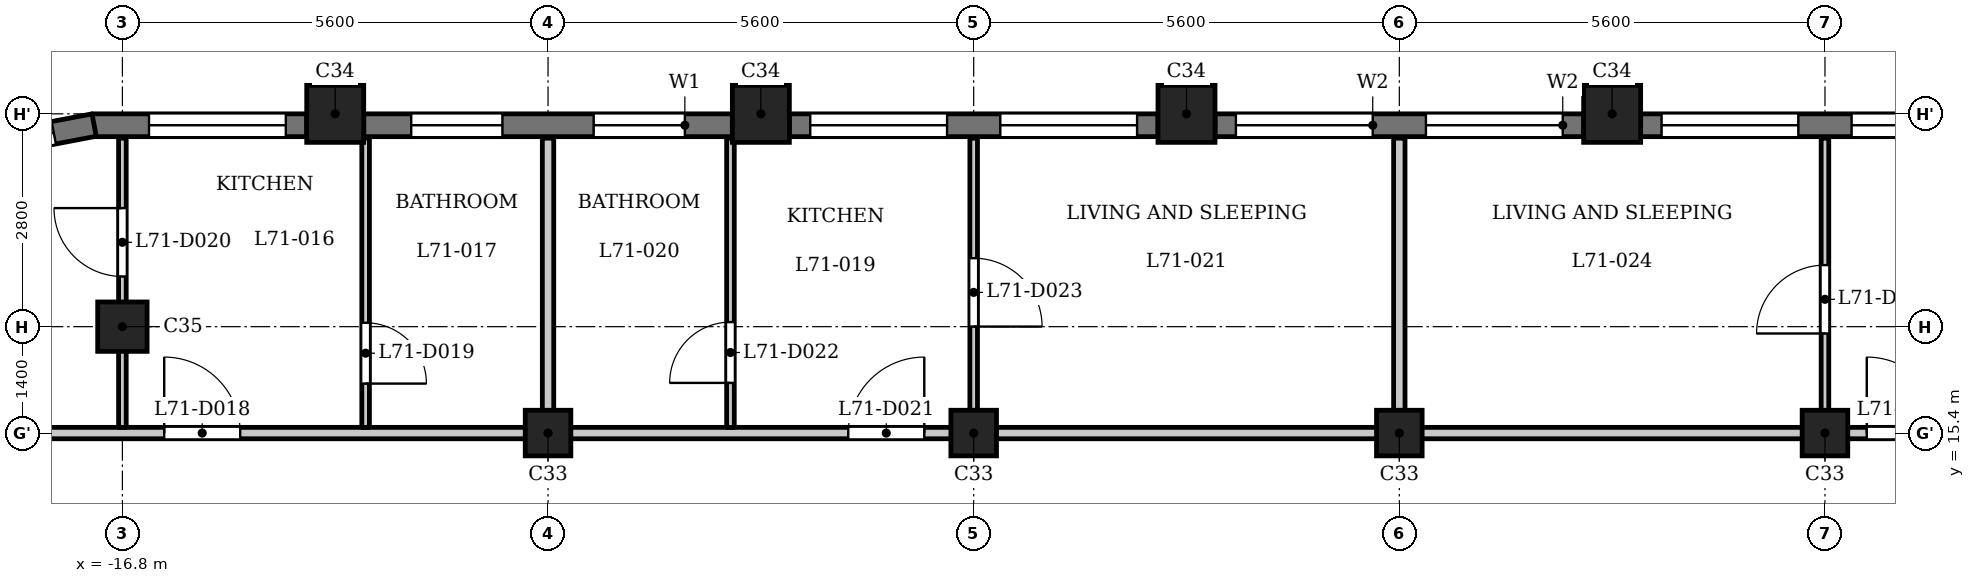
"""IFC4 building model, lengths in metres.
Left out: names, types, materials, properties, quantities, classifications, styles, units other than length and angle.
Written with IfcOpenShell. Run it as: python <this file> out.ifc"""

import sys

from ifc_helpers import new_model, si_unit, direction, frame, frame_2d, origin, origin_2d, place, context, subcontext, project, spatial, rectangle, extrude, element, fill, save


model = new_model("IFC4")
c1 = context("Model", 3, precision=1e-05, world=origin(), true_north=direction((0.0, 1.0)))
c2 = subcontext(c1, "Body", "Model", "MODEL_VIEW")
j1 = project(units=[si_unit("LENGTHUNIT", "METRE"), si_unit("PLANEANGLEUNIT", "RADIAN")], contexts=[c1])
p1 = place(None, origin())
s1 = spatial("IfcSite", under=j1, at=p1, CompositionType="ELEMENT")
p2 = place(p1, origin())
s2 = spatial("IfcBuilding", under=s1, at=p2, CompositionType="ELEMENT")
p3 = place(p2, frame((0.0, 0.0, 273.2)))
s3 = spatial("IfcBuildingStorey", under=s2, at=p3, CompositionType="ELEMENT", Elevation=273.2)
for number, where, z_axis, x_axis in (
    (1, (2.8, 19.6, 0.0), (0.0, 0.0, 1.0), (1.0, 0.0, 0.0)),
    (2, (-2.8, 19.6, 0.0), (0.0, 0.0, 1.0), (1.0, 0.0, 0.0)),
    (3, (-8.4, 19.6, 0.0), (0.0, 0.0, 1.0), (1.0, 0.0, 0.0)),
    (4, (-14.0, 19.6, 0.0), (0.0, 0.0, 1.0), (1.0, 0.0, 0.0)),
):
    element("IfcColumn", number, at=place(p3, frame(where, z_axis=z_axis, x_axis=x_axis)), inside=s3, PredefinedType="COLUMN", context=c2, shape_type="SweptSolid", body=[
        extrude(rectangle(XDim=0.75, YDim=0.75, at=origin_2d()), origin(), (0.0, 0.0, 1.0), 3.5),
    ])
p4 = place(p3, frame((-16.8, 16.8, 0.0), z_axis=(0.0, 0.0, 1.0), x_axis=(1.0, 0.0, 0.0)))
e5 = element("IfcColumn", 5, at=p4, inside=s3, PredefinedType="COLUMN", context=c2, shape_type="SweptSolid", body=[
    extrude(rectangle(XDim=0.65, YDim=0.65, at=origin_2d()), origin(), (0.0, 0.0, 1.0), 3.5),
])
for number, where, z_axis, x_axis in (
    (6, (-11.2, 15.4, 0.0), (0.0, 0.0, 1.0), (1.0, 0.0, 0.0)),
    (7, (-5.6, 15.4, 0.0), (0.0, 0.0, 1.0), (1.0, 0.0, 0.0)),
    (8, (0.0, 15.4, 0.0), (0.0, 0.0, 1.0), (1.0, 0.0, 0.0)),
    (9, (5.6, 15.4, 0.0), (0.0, 0.0, 1.0), (1.0, 0.0, 0.0)),
):
    element("IfcColumn", number, at=place(p3, frame(where, z_axis=z_axis, x_axis=x_axis)), inside=s3, PredefinedType="COLUMN", context=c2, shape_type="SweptSolid", body=[
        extrude(rectangle(XDim=0.6, YDim=0.6, at=origin_2d()), origin(), (0.0, 0.0, 1.0), 3.5),
    ])
p5 = place(p3, frame((8.025, 19.45, 0.0), z_axis=(0.0, 0.0, 1.0), x_axis=(-1.0, 0.0, 0.0)))
e10 = element("IfcWall", 10, at=p5, inside=s3, PredefinedType="SOLIDWALL", context=c2, shape_type="SweptSolid", body=[
    extrude(rectangle(XDim=4.85, YDim=0.3, at=frame_2d((2.425, 0.0))), origin(), (0.0, 0.0, 1.0), 2.55),
])
p6 = place(p5, frame((0.275, 0.0, 0.9)))
e11 = element("IfcOpeningElement", 11, at=p6, cuts=e10, PredefinedType="OPENING", context=c2, shape_type="SweptSolid", body=[
    extrude(rectangle(XDim=1.8, YDim=1.25, at=frame_2d((0.9, 0.625))), frame((0.0, 0.16, 0.0), z_axis=(0.0, -1.0, 0.0), x_axis=(1.0, 0.0, 0.0)), (0.0, 0.0, 1.0), 0.32),
])
p7 = place(p5, frame((2.775, 0.0, 0.9)))
e12 = element("IfcOpeningElement", 12, at=p7, cuts=e10, PredefinedType="OPENING", context=c2, shape_type="SweptSolid", body=[
    extrude(rectangle(XDim=1.8, YDim=1.25, at=frame_2d((0.9, 0.625))), frame((0.0, 0.16, 0.0), z_axis=(0.0, -1.0, 0.0), x_axis=(1.0, 0.0, 0.0)), (0.0, 0.0, 1.0), 0.32),
])
p8 = place(p3, frame((2.425, 19.45, 0.0), z_axis=(0.0, 0.0, 1.0), x_axis=(-1.0, 0.0, 0.0)))
e13 = element("IfcWall", 13, at=p8, inside=s3, PredefinedType="SOLIDWALL", context=c2, shape_type="SweptSolid", body=[
    extrude(rectangle(XDim=4.85, YDim=0.3, at=frame_2d((2.425, 0.0))), origin(), (0.0, 0.0, 1.0), 2.55),
])
p9 = place(p8, frame((0.275, 0.0, 0.9)))
e14 = element("IfcOpeningElement", 14, at=p9, cuts=e13, PredefinedType="OPENING", context=c2, shape_type="SweptSolid", body=[
    extrude(rectangle(XDim=1.8, YDim=1.25, at=frame_2d((0.9, 0.625))), frame((0.0, 0.16, 0.0), z_axis=(0.0, -1.0, 0.0), x_axis=(1.0, 0.0, 0.0)), (0.0, 0.0, 1.0), 0.32),
])
p10 = place(p8, frame((2.775, 0.0, 0.9)))
e15 = element("IfcOpeningElement", 15, at=p10, cuts=e13, PredefinedType="OPENING", context=c2, shape_type="SweptSolid", body=[
    extrude(rectangle(XDim=1.8, YDim=1.25, at=frame_2d((0.9, 0.625))), frame((0.0, 0.16, 0.0), z_axis=(0.0, -1.0, 0.0), x_axis=(1.0, 0.0, 0.0)), (0.0, 0.0, 1.0), 0.32),
])
p11 = place(p3, frame((-3.175, 19.45, 0.0), z_axis=(0.0, 0.0, 1.0), x_axis=(-1.0, 0.0, 0.0)))
e16 = element("IfcWall", 16, at=p11, inside=s3, PredefinedType="SOLIDWALL", context=c2, shape_type="SweptSolid", body=[
    extrude(rectangle(XDim=4.85, YDim=0.3, at=frame_2d((2.425, 0.0))), origin(), (0.0, 0.0, 1.0), 2.55),
])
p12 = place(p11, frame((0.275, 0.0, 0.9)))
e17 = element("IfcOpeningElement", 17, at=p12, cuts=e16, PredefinedType="OPENING", context=c2, shape_type="SweptSolid", body=[
    extrude(rectangle(XDim=1.8, YDim=1.25, at=frame_2d((0.9, 0.625))), frame((0.0, 0.16, 0.0), z_axis=(0.0, -1.0, 0.0), x_axis=(1.0, 0.0, 0.0)), (0.0, 0.0, 1.0), 0.32),
])
p13 = place(p11, frame((2.775, 0.0, 0.9)))
e18 = element("IfcOpeningElement", 18, at=p13, cuts=e16, PredefinedType="OPENING", context=c2, shape_type="SweptSolid", body=[
    extrude(rectangle(XDim=1.8, YDim=1.25, at=frame_2d((0.9, 0.625))), frame((0.0, 0.16, 0.0), z_axis=(0.0, -1.0, 0.0), x_axis=(1.0, 0.0, 0.0)), (0.0, 0.0, 1.0), 0.32),
])
p14 = place(p3, frame((-8.775, 19.45, 0.0), z_axis=(0.0, 0.0, 1.0), x_axis=(-1.0, 0.0, 0.0)))
e19 = element("IfcWall", 19, at=p14, inside=s3, PredefinedType="SOLIDWALL", context=c2, shape_type="SweptSolid", body=[
    extrude(rectangle(XDim=4.85, YDim=0.3, at=frame_2d((2.425, 0.0))), origin(), (0.0, 0.0, 1.0), 2.55),
])
p15 = place(p14, frame((0.625, 0.0, 0.6)))
e20 = element("IfcOpeningElement", 20, at=p15, cuts=e19, PredefinedType="OPENING", context=c2, shape_type="SweptSolid", body=[
    extrude(rectangle(XDim=1.2, YDim=1.55, at=frame_2d((0.6, 0.775))), frame((0.0, 0.16, 0.0), z_axis=(0.0, -1.0, 0.0), x_axis=(1.0, 0.0, 0.0)), (0.0, 0.0, 1.0), 0.32),
])
p16 = place(p14, frame((3.025, 0.0, 0.6)))
e21 = element("IfcOpeningElement", 21, at=p16, cuts=e19, PredefinedType="OPENING", context=c2, shape_type="SweptSolid", body=[
    extrude(rectangle(XDim=1.2, YDim=1.55, at=frame_2d((0.6, 0.775))), frame((0.0, 0.16, 0.0), z_axis=(0.0, -1.0, 0.0), x_axis=(1.0, 0.0, 0.0)), (0.0, 0.0, 1.0), 0.32),
])
p17 = place(p3, frame((-14.375, 19.45, 0.0), z_axis=(0.0, 0.0, 1.0), x_axis=(-1.0, 0.0, 0.0)))
e22 = element("IfcWall", 22, at=p17, inside=s3, PredefinedType="SOLIDWALL", context=c2, shape_type="SweptSolid", body=[
    extrude(rectangle(XDim=2.825, YDim=0.3, at=frame_2d((1.413, 0.0))), origin(), (0.0, 0.0, 1.0), 2.55),
])
p18 = place(p17, frame((0.275, 0.0, 0.9)))
e23 = element("IfcOpeningElement", 23, at=p18, cuts=e22, PredefinedType="OPENING", context=c2, shape_type="SweptSolid", body=[
    extrude(rectangle(XDim=1.8, YDim=1.25, at=frame_2d((0.9, 0.625))), frame((0.0, 0.16, 0.0), z_axis=(0.0, -1.0, 0.0), x_axis=(1.0, 0.0, 0.0)), (0.0, 0.0, 1.0), 0.32),
])
p19 = place(p3, frame((-17.172, 19.453, 0.0), z_axis=(0.0, 0.0, 1.0), x_axis=(-0.982284001233, -0.187398348234, 0.0)))
e24 = element("IfcWall", 24, at=p19, inside=s3, PredefinedType="SOLIDWALL", context=c2, shape_type="SweptSolid", body=[
    extrude(rectangle(XDim=1.881, YDim=0.3, at=frame_2d((0.941, 0.0))), origin(), (0.0, 0.0, 1.0), 2.55),
])
p20 = place(p19, frame((0.541, 0.0, 0.6)))
e25 = element("IfcOpeningElement", 25, at=p20, cuts=e24, PredefinedType="OPENING", context=c2, shape_type="SweptSolid", body=[
    extrude(rectangle(XDim=0.8, YDim=1.55, at=frame_2d((0.4, 0.775))), frame((0.0, 0.16, 0.0), z_axis=(0.0, -1.0, 0.0), x_axis=(1.0, 0.0, 0.0)), (0.0, 0.0, 1.0), 0.32),
])
p21 = place(p3, frame((-23.55, 15.4, 0.0), z_axis=(0.0, 0.0, 1.0), x_axis=(1.0, 0.0, 0.0)))
e26 = element("IfcWall", 26, at=p21, inside=s3, PredefinedType="PARTITIONING", context=c2, shape_type="SweptSolid", body=[
    extrude(rectangle(XDim=46.872, YDim=0.15, at=frame_2d((23.436, 0.0))), origin(), (0.0, 0.0, 1.0), 3.2),
])
p22 = place(p21, frame((7.3, 0.0, 0.0)))
e27 = element("IfcOpeningElement", 27, at=p22, cuts=e26, PredefinedType="OPENING", context=c2, shape_type="SweptSolid", body=[
    extrude(rectangle(XDim=1.0, YDim=2.1, at=frame_2d((0.5, 1.05))), frame((0.0, 0.085, 0.0), z_axis=(0.0, -1.0, 0.0), x_axis=(1.0, 0.0, 0.0)), (0.0, 0.0, 1.0), 0.17),
])
p23 = place(p21, frame((16.3, 0.0, 0.0)))
e28 = element("IfcOpeningElement", 28, at=p23, cuts=e26, PredefinedType="OPENING", context=c2, shape_type="SweptSolid", body=[
    extrude(rectangle(XDim=1.0, YDim=2.1, at=frame_2d((0.5, 1.05))), frame((0.0, 0.085, 0.0), z_axis=(0.0, -1.0, 0.0), x_axis=(1.0, 0.0, 0.0)), (0.0, 0.0, 1.0), 0.17),
])
p24 = place(p21, frame((29.7, 0.0, 0.0)))
e29 = element("IfcOpeningElement", 29, at=p24, cuts=e26, PredefinedType="OPENING", context=c2, shape_type="SweptSolid", body=[
    extrude(rectangle(XDim=1.0, YDim=2.1, at=frame_2d((0.5, 1.05))), frame((0.0, 0.085, 0.0), z_axis=(0.0, -1.0, 0.0), x_axis=(1.0, 0.0, 0.0)), (0.0, 0.0, 1.0), 0.17),
])
p25 = place(p21, frame((38.7, 0.0, 0.0)))
e30 = element("IfcOpeningElement", 30, at=p25, cuts=e26, PredefinedType="OPENING", context=c2, shape_type="SweptSolid", body=[
    extrude(rectangle(XDim=1.0, YDim=2.1, at=frame_2d((0.5, 1.05))), frame((0.0, 0.085, 0.0), z_axis=(0.0, -1.0, 0.0), x_axis=(1.0, 0.0, 0.0)), (0.0, 0.0, 1.0), 0.17),
])
p26 = place(p3, frame((-16.8, 15.475, 0.0), z_axis=(0.0, 0.0, 1.0), x_axis=(0.0, 1.0, 0.0)))
e31 = element("IfcWall", 31, at=p26, inside=s3, PredefinedType="PARTITIONING", context=c2, shape_type="SweptSolid", body=[
    extrude(rectangle(XDim=3.805, YDim=0.1, at=frame_2d((1.902, 0.0))), origin(), (0.0, 0.0, 1.0), 3.2),
])
p27 = place(p26, frame((1.985, 0.0, 0.0)))
e32 = element("IfcOpeningElement", 32, at=p27, cuts=e31, PredefinedType="OPENING", context=c2, shape_type="SweptSolid", body=[
    extrude(rectangle(XDim=0.9, YDim=2.1, at=frame_2d((0.45, 1.05))), frame((0.0, 0.06, 0.0), z_axis=(0.0, -1.0, 0.0), x_axis=(1.0, 0.0, 0.0)), (0.0, 0.0, 1.0), 0.12),
])
p28 = place(p3, frame((-13.6, 15.475, 0.0), z_axis=(0.0, 0.0, 1.0), x_axis=(0.0, 1.0, 0.0)))
e33 = element("IfcWall", 33, at=p28, inside=s3, PredefinedType="PARTITIONING", context=c2, shape_type="SweptSolid", body=[
    extrude(rectangle(XDim=3.805, YDim=0.1, at=frame_2d((1.902, 0.0))), origin(), (0.0, 0.0, 1.0), 3.2),
])
p29 = place(p28, frame((0.576, 0.0, 0.0)))
e34 = element("IfcOpeningElement", 34, at=p29, cuts=e33, PredefinedType="OPENING", context=c2, shape_type="SweptSolid", body=[
    extrude(rectangle(XDim=0.8, YDim=2.1, at=frame_2d((0.4, 1.05))), frame((0.0, 0.06, 0.0), z_axis=(0.0, -1.0, 0.0), x_axis=(1.0, 0.0, 0.0)), (0.0, 0.0, 1.0), 0.12),
])
p30 = place(p3, frame((-11.2, 15.475, 0.0), z_axis=(0.0, 0.0, 1.0), x_axis=(0.0, 1.0, 0.0)))
e35 = element("IfcWall", 35, at=p30, inside=s3, PredefinedType="PARTITIONING", context=c2, shape_type="SweptSolid", body=[
    extrude(rectangle(XDim=3.805, YDim=0.15, at=frame_2d((1.902, 0.0))), origin(), (0.0, 0.0, 1.0), 3.2),
])
p31 = place(p3, frame((-8.8, 15.475, 0.0), z_axis=(0.0, 0.0, 1.0), x_axis=(0.0, 1.0, 0.0)))
e36 = element("IfcWall", 36, at=p31, inside=s3, PredefinedType="PARTITIONING", context=c2, shape_type="SweptSolid", body=[
    extrude(rectangle(XDim=3.805, YDim=0.1, at=frame_2d((1.902, 0.0))), origin(), (0.0, 0.0, 1.0), 3.2),
])
p32 = place(p31, frame((0.585, 0.0, 0.0)))
e37 = element("IfcOpeningElement", 37, at=p32, cuts=e36, PredefinedType="OPENING", context=c2, shape_type="SweptSolid", body=[
    extrude(rectangle(XDim=0.8, YDim=2.1, at=frame_2d((0.4, 1.05))), frame((0.0, 0.06, 0.0), z_axis=(0.0, -1.0, 0.0), x_axis=(1.0, 0.0, 0.0)), (0.0, 0.0, 1.0), 0.12),
])
p33 = place(p3, frame((-5.6, 15.475, 0.0), z_axis=(0.0, 0.0, 1.0), x_axis=(0.0, 1.0, 0.0)))
e38 = element("IfcWall", 38, at=p33, inside=s3, PredefinedType="PARTITIONING", context=c2, shape_type="SweptSolid", body=[
    extrude(rectangle(XDim=3.805, YDim=0.1, at=frame_2d((1.902, 0.0))), origin(), (0.0, 0.0, 1.0), 3.2),
])
p34 = place(p33, frame((1.326, 0.0, 0.0)))
e39 = element("IfcOpeningElement", 39, at=p34, cuts=e38, PredefinedType="OPENING", context=c2, shape_type="SweptSolid", body=[
    extrude(rectangle(XDim=0.9, YDim=2.1, at=frame_2d((0.45, 1.05))), frame((0.0, 0.06, 0.0), z_axis=(0.0, -1.0, 0.0), x_axis=(1.0, 0.0, 0.0)), (0.0, 0.0, 1.0), 0.12),
])
p35 = place(p3, frame((0.0, 15.475, 0.0), z_axis=(0.0, 0.0, 1.0), x_axis=(0.0, 1.0, 0.0)))
e40 = element("IfcWall", 40, at=p35, inside=s3, PredefinedType="PARTITIONING", context=c2, shape_type="SweptSolid", body=[
    extrude(rectangle(XDim=3.805, YDim=0.15, at=frame_2d((1.902, 0.0))), origin(), (0.0, 0.0, 1.0), 3.2),
])
p36 = place(p3, frame((5.6, 15.475, 0.0), z_axis=(0.0, 0.0, 1.0), x_axis=(0.0, 1.0, 0.0)))
e41 = element("IfcWall", 41, at=p36, inside=s3, PredefinedType="PARTITIONING", context=c2, shape_type="SweptSolid", body=[
    extrude(rectangle(XDim=3.805, YDim=0.1, at=frame_2d((1.902, 0.0))), origin(), (0.0, 0.0, 1.0), 3.2),
])
p37 = place(p36, frame((1.235, 0.0, 0.0)))
e42 = element("IfcOpeningElement", 42, at=p37, cuts=e41, PredefinedType="OPENING", context=c2, shape_type="SweptSolid", body=[
    extrude(rectangle(XDim=0.9, YDim=2.1, at=frame_2d((0.45, 1.05))), frame((0.0, 0.06, 0.0), z_axis=(0.0, -1.0, 0.0), x_axis=(1.0, 0.0, 0.0)), (0.0, 0.0, 1.0), 0.12),
])
p38 = place(p22, origin())
e43 = element("IfcDoor", 43, at=p38, inside=s3, OperationType="SINGLE_SWING_RIGHT", PredefinedType="DOOR", context=c2, shape_type="SweptSolid", body=[
    extrude(rectangle(XDim=1.0, YDim=2.1, at=frame_2d((0.5, 1.05))), frame((0.0, 0.025, 0.0), z_axis=(0.0, -1.0, 0.0), x_axis=(1.0, 0.0, 0.0)), (0.0, 0.0, 1.0), 0.05),
])
fill(e27, e43)
p39 = place(p29, origin())
e44 = element("IfcDoor", 44, at=p39, inside=s3, OperationType="SINGLE_SWING_LEFT", PredefinedType="DOOR", context=c2, shape_type="SweptSolid", body=[
    extrude(rectangle(XDim=0.8, YDim=2.1, at=frame_2d((0.4, 1.05))), frame((0.0, 0.025, 0.0), z_axis=(0.0, -1.0, 0.0), x_axis=(1.0, 0.0, 0.0)), (0.0, 0.0, 1.0), 0.05),
])
fill(e34, e44)
p40 = place(p27, origin())
e45 = element("IfcDoor", 45, at=p40, inside=s3, OperationType="SINGLE_SWING_LEFT", PredefinedType="DOOR", context=c2, shape_type="SweptSolid", body=[
    extrude(rectangle(XDim=0.9, YDim=2.1, at=frame_2d((0.45, 1.05))), frame((0.0, 0.025, 0.0), z_axis=(0.0, -1.0, 0.0), x_axis=(1.0, 0.0, 0.0)), (0.0, 0.0, 1.0), 0.05),
])
fill(e32, e45)
p41 = place(p23, origin())
e46 = element("IfcDoor", 46, at=p41, inside=s3, OperationType="SINGLE_SWING_LEFT", PredefinedType="DOOR", context=c2, shape_type="SweptSolid", body=[
    extrude(rectangle(XDim=1.0, YDim=2.1, at=frame_2d((0.5, 1.05))), frame((0.0, 0.025, 0.0), z_axis=(0.0, -1.0, 0.0), x_axis=(1.0, 0.0, 0.0)), (0.0, 0.0, 1.0), 0.05),
])
fill(e28, e46)
p42 = place(p32, origin())
e47 = element("IfcDoor", 47, at=p42, inside=s3, OperationType="SINGLE_SWING_RIGHT", PredefinedType="DOOR", context=c2, shape_type="SweptSolid", body=[
    extrude(rectangle(XDim=0.8, YDim=2.1, at=frame_2d((0.4, 1.05))), frame((0.0, 0.025, 0.0), z_axis=(0.0, -1.0, 0.0), x_axis=(1.0, 0.0, 0.0)), (0.0, 0.0, 1.0), 0.05),
])
fill(e37, e47)
p43 = place(p34, origin())
e48 = element("IfcDoor", 48, at=p43, inside=s3, OperationType="SINGLE_SWING_LEFT", PredefinedType="DOOR", context=c2, shape_type="SweptSolid", body=[
    extrude(rectangle(XDim=0.9, YDim=2.1, at=frame_2d((0.45, 1.05))), frame((0.0, 0.025, 0.0), z_axis=(0.0, -1.0, 0.0), x_axis=(1.0, 0.0, 0.0)), (0.0, 0.0, 1.0), 0.05),
])
fill(e39, e48)
p44 = place(p24, origin())
e49 = element("IfcDoor", 49, at=p44, inside=s3, OperationType="SINGLE_SWING_RIGHT", PredefinedType="DOOR", context=c2, shape_type="SweptSolid", body=[
    extrude(rectangle(XDim=1.0, YDim=2.1, at=frame_2d((0.5, 1.05))), frame((0.0, 0.025, 0.0), z_axis=(0.0, -1.0, 0.0), x_axis=(1.0, 0.0, 0.0)), (0.0, 0.0, 1.0), 0.05),
])
fill(e29, e49)
p45 = place(p37, origin())
e50 = element("IfcDoor", 50, at=p45, inside=s3, OperationType="SINGLE_SWING_RIGHT", PredefinedType="DOOR", context=c2, shape_type="SweptSolid", body=[
    extrude(rectangle(XDim=0.9, YDim=2.1, at=frame_2d((0.45, 1.05))), frame((0.0, 0.025, 0.0), z_axis=(0.0, -1.0, 0.0), x_axis=(1.0, 0.0, 0.0)), (0.0, 0.0, 1.0), 0.05),
])
fill(e42, e50)
p46 = place(p6, origin())
e51 = element("IfcWindow", 51, at=p46, inside=s3, PartitioningType="SINGLE_PANEL", PredefinedType="WINDOW", context=c2, shape_type="SweptSolid", body=[
    extrude(rectangle(XDim=1.8, YDim=1.25, at=frame_2d((0.9, 0.625))), frame((0.0, 0.03, 0.0), z_axis=(0.0, -1.0, 0.0), x_axis=(1.0, 0.0, 0.0)), (0.0, 0.0, 1.0), 0.06),
])
fill(e11, e51)
p47 = place(p7, origin())
e52 = element("IfcWindow", 52, at=p47, inside=s3, PartitioningType="SINGLE_PANEL", PredefinedType="WINDOW", context=c2, shape_type="SweptSolid", body=[
    extrude(rectangle(XDim=1.8, YDim=1.25, at=frame_2d((0.9, 0.625))), frame((0.0, 0.03, 0.0), z_axis=(0.0, -1.0, 0.0), x_axis=(1.0, 0.0, 0.0)), (0.0, 0.0, 1.0), 0.06),
])
fill(e12, e52)
p48 = place(p9, origin())
e53 = element("IfcWindow", 53, at=p48, inside=s3, PartitioningType="SINGLE_PANEL", PredefinedType="WINDOW", context=c2, shape_type="SweptSolid", body=[
    extrude(rectangle(XDim=1.8, YDim=1.25, at=frame_2d((0.9, 0.625))), frame((0.0, 0.03, 0.0), z_axis=(0.0, -1.0, 0.0), x_axis=(1.0, 0.0, 0.0)), (0.0, 0.0, 1.0), 0.06),
])
fill(e14, e53)
p49 = place(p10, origin())
e54 = element("IfcWindow", 54, at=p49, inside=s3, PartitioningType="SINGLE_PANEL", PredefinedType="WINDOW", context=c2, shape_type="SweptSolid", body=[
    extrude(rectangle(XDim=1.8, YDim=1.25, at=frame_2d((0.9, 0.625))), frame((0.0, 0.03, 0.0), z_axis=(0.0, -1.0, 0.0), x_axis=(1.0, 0.0, 0.0)), (0.0, 0.0, 1.0), 0.06),
])
fill(e15, e54)
p50 = place(p12, origin())
e55 = element("IfcWindow", 55, at=p50, inside=s3, PartitioningType="SINGLE_PANEL", PredefinedType="WINDOW", context=c2, shape_type="SweptSolid", body=[
    extrude(rectangle(XDim=1.8, YDim=1.25, at=frame_2d((0.9, 0.625))), frame((0.0, 0.03, 0.0), z_axis=(0.0, -1.0, 0.0), x_axis=(1.0, 0.0, 0.0)), (0.0, 0.0, 1.0), 0.06),
])
fill(e17, e55)
p51 = place(p13, origin())
e56 = element("IfcWindow", 56, at=p51, inside=s3, PartitioningType="SINGLE_PANEL", PredefinedType="WINDOW", context=c2, shape_type="SweptSolid", body=[
    extrude(rectangle(XDim=1.8, YDim=1.25, at=frame_2d((0.9, 0.625))), frame((0.0, 0.03, 0.0), z_axis=(0.0, -1.0, 0.0), x_axis=(1.0, 0.0, 0.0)), (0.0, 0.0, 1.0), 0.06),
])
fill(e18, e56)
p52 = place(p15, origin())
e57 = element("IfcWindow", 57, at=p52, inside=s3, PartitioningType="SINGLE_PANEL", PredefinedType="WINDOW", context=c2, shape_type="SweptSolid", body=[
    extrude(rectangle(XDim=1.2, YDim=1.55, at=frame_2d((0.6, 0.775))), frame((0.0, 0.03, 0.0), z_axis=(0.0, -1.0, 0.0), x_axis=(1.0, 0.0, 0.0)), (0.0, 0.0, 1.0), 0.06),
])
fill(e20, e57)
p53 = place(p16, origin())
e58 = element("IfcWindow", 58, at=p53, inside=s3, PartitioningType="SINGLE_PANEL", PredefinedType="WINDOW", context=c2, shape_type="SweptSolid", body=[
    extrude(rectangle(XDim=1.2, YDim=1.55, at=frame_2d((0.6, 0.775))), frame((0.0, 0.03, 0.0), z_axis=(0.0, -1.0, 0.0), x_axis=(1.0, 0.0, 0.0)), (0.0, 0.0, 1.0), 0.06),
])
fill(e21, e58)
p54 = place(p18, origin())
e59 = element("IfcWindow", 59, at=p54, inside=s3, PartitioningType="SINGLE_PANEL", PredefinedType="WINDOW", context=c2, shape_type="SweptSolid", body=[
    extrude(rectangle(XDim=1.8, YDim=1.25, at=frame_2d((0.9, 0.625))), frame((0.0, 0.03, 0.0), z_axis=(0.0, -1.0, 0.0), x_axis=(1.0, 0.0, 0.0)), (0.0, 0.0, 1.0), 0.06),
])
fill(e23, e59)
p55 = place(p20, origin())
e60 = element("IfcWindow", 60, at=p55, inside=s3, PartitioningType="SINGLE_PANEL", PredefinedType="WINDOW", context=c2, shape_type="SweptSolid", body=[
    extrude(rectangle(XDim=0.8, YDim=1.55, at=frame_2d((0.4, 0.775))), frame((0.0, 0.03, 0.0), z_axis=(0.0, -1.0, 0.0), x_axis=(1.0, 0.0, 0.0)), (0.0, 0.0, 1.0), 0.06),
])
fill(e25, e60)
save(model, sys.argv[1])
